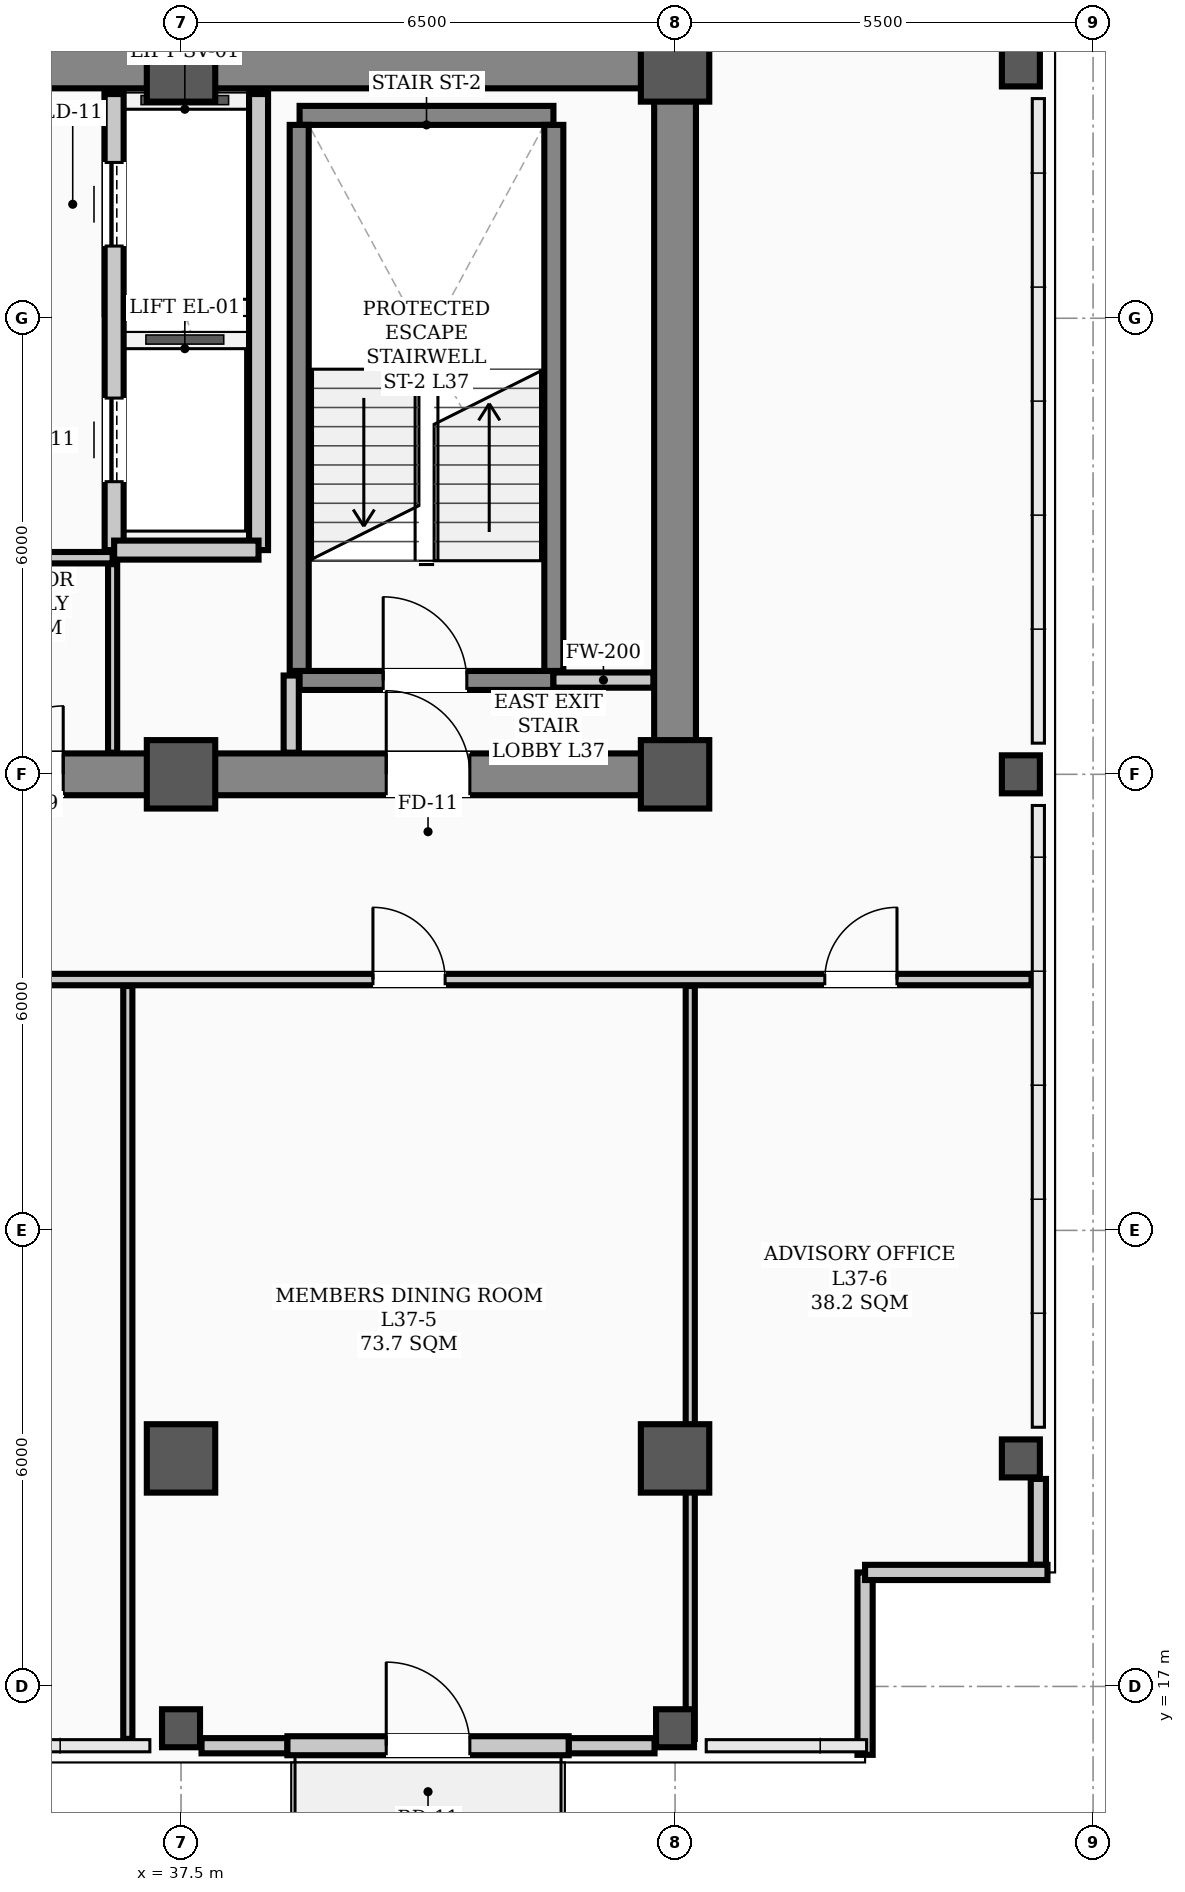
"""IFC4 building model, lengths in metres.
Left out: names, types, materials, properties, quantities, classifications, styles, units other than length and angle.
Written with IfcOpenShell. Run it as: python <this file> out.ifc"""

import sys

from ifc_helpers import new_model, si_unit, direction, frame, frame_2d, origin, origin_2d, place, context, subcontext, project, spatial, rectangle, hollow_rectangle, extrude, element, fill, save


model = new_model("IFC4")
c1 = context("Model", 3, precision=1e-05, world=origin(), true_north=direction((0.0, 1.0)))
c2 = subcontext(c1, "Body", "Model", "MODEL_VIEW")
j1 = project(units=[si_unit("LENGTHUNIT", "METRE"), si_unit("PLANEANGLEUNIT", "RADIAN")], contexts=[c1])
p1 = place(None, origin())
s1 = spatial("IfcSite", under=j1, at=p1, CompositionType="ELEMENT")
p2 = place(p1, origin())
s2 = spatial("IfcBuilding", under=s1, at=p2, CompositionType="ELEMENT")
p3 = place(p2, frame((0.0, 0.0, 150.0)))
s3 = spatial("IfcBuildingStorey", under=s2, at=p3, CompositionType="ELEMENT", Elevation=150.0)
for number, where, z_axis, x_axis in (
    (1, (37.5, 29.0, 0.0), (0.0, 0.0, 1.0), (1.0, 0.0, 0.0)),
    (2, (37.5, 38.3, 0.0), (0.0, 0.0, 1.0), (1.0, 0.0, 0.0)),
    (3, (44.0, 29.0, 0.0), (0.0, 0.0, 1.0), (1.0, 0.0, 0.0)),
    (4, (44.0, 38.3, 0.0), (0.0, 0.0, 1.0), (1.0, 0.0, 0.0)),
    (5, (37.5, 20.0, 0.0), (0.0, 0.0, 1.0), (1.0, 0.0, 0.0)),
    (6, (44.0, 20.0, 0.0), (0.0, 0.0, 1.0), (1.0, 0.0, 0.0)),
):
    element("IfcColumn", number, at=place(p3, frame(where, z_axis=z_axis, x_axis=x_axis)), inside=s3, PredefinedType="COLUMN", context=c2, shape_type="SweptSolid", body=[
        extrude(hollow_rectangle(XDim=0.9, YDim=0.9, WallThickness=0.035, InnerFilletRadius=0.017, OuterFilletRadius=0.052, at=origin_2d()), origin(), (0.0, 0.0, 1.0), 3.9),
    ])
for number, where, z_axis, x_axis in (
    (7, (37.5, 16.45, 0.0), (0.0, 0.0, 1.0), (1.0, 0.0, 0.0)),
    (8, (44.0, 16.45, 0.0), (0.0, 0.0, 1.0), (1.0, 0.0, 0.0)),
    (9, (48.55, 20.0, 0.0), (0.0, 0.0, 1.0), (1.0, 0.0, 0.0)),
    (10, (48.55, 29.0, 0.0), (0.0, 0.0, 1.0), (1.0, 0.0, 0.0)),
    (11, (48.55, 38.3, 0.0), (0.0, 0.0, 1.0), (1.0, 0.0, 0.0)),
):
    element("IfcColumn", number, at=place(p3, frame(where, z_axis=z_axis, x_axis=x_axis)), inside=s3, PredefinedType="COLUMN", context=c2, shape_type="SweptSolid", body=[
        extrude(hollow_rectangle(XDim=0.5, YDim=0.5, WallThickness=0.024, InnerFilletRadius=0.012, OuterFilletRadius=0.036, at=origin_2d()), origin(), (0.0, 0.0, 1.0), 3.9),
    ])
for number, where, z_axis, x_axis in (
    (12, (48.78, 18.6, 0.0), (0.0, 0.0, 1.0), (0.0, 1.0, 0.0)),
    (13, (37.77, 16.22, 0.0), (0.0, 0.0, 1.0), (1.0, 0.0, 0.0)),
    (14, (42.6, 16.22, 0.0), (0.0, 0.0, 1.0), (1.0, 0.0, 0.0)),
):
    element("IfcWall", number, at=place(p3, frame(where, z_axis=z_axis, x_axis=x_axis)), inside=s3, PredefinedType="PARAPET", context=c2, shape_type="SweptSolid", body=[
        extrude(rectangle(XDim=1.13, YDim=0.2, at=frame_2d((0.565, 0.0))), origin(), (0.0, 0.0, 1.0), 1.2),
    ])
for number, where, z_axis, x_axis in (
    (15, (46.5, 16.1, 0.0), (0.0, 0.0, 1.0), (0.0, 1.0, 0.0)),
    (16, (46.5, 18.5, 0.0), (0.0, 0.0, 1.0), (1.0, 0.0, 0.0)),
):
    element("IfcWall", number, at=place(p3, frame(where, z_axis=z_axis, x_axis=x_axis)), inside=s3, PredefinedType="PARAPET", context=c2, shape_type="SweptSolid", body=[
        extrude(rectangle(XDim=2.4, YDim=0.2, at=frame_2d((1.2, 0.0))), origin(), (0.0, 0.0, 1.0), 1.2),
    ])
p4 = place(p3, frame((38.9, 16.22, 0.0), z_axis=(0.0, 0.0, 1.0), x_axis=(1.0, 0.0, 0.0)))
e17 = element("IfcWall", 17, at=p4, inside=s3, PredefinedType="STANDARD", context=c2, shape_type="SweptSolid", body=[
    extrude(rectangle(XDim=3.7, YDim=0.25, at=frame_2d((1.85, 0.0))), origin(), (0.0, 0.0, 1.0), 3.18),
])
p5 = place(p4, frame((1.3, 0.0, 0.0)))
e18 = element("IfcOpeningElement", 18, at=p5, cuts=e17, PredefinedType="OPENING", context=c2, shape_type="SweptSolid", body=[
    extrude(rectangle(XDim=1.1, YDim=2.2, at=frame_2d((0.55, 1.1))), frame((0.0, 0.135, 0.0), z_axis=(0.0, -1.0, 0.0), x_axis=(1.0, 0.0, 0.0)), (0.0, 0.0, 1.0), 0.27),
])
p6 = place(p3, frame((13.5, 29.0, 0.0), z_axis=(0.0, 0.0, 1.0), x_axis=(1.0, 0.0, 0.0)))
e19 = element("IfcWall", 19, at=p6, inside=s3, PredefinedType="SHEAR", context=c2, shape_type="SweptSolid", body=[
    extrude(rectangle(XDim=30.5, YDim=0.55, at=frame_2d((15.25, 0.0))), origin(), (0.0, 0.0, 1.0), 3.72),
])
p7 = place(p6, frame((1.75, 0.0, 0.0)))
e20 = element("IfcOpeningElement", 20, at=p7, cuts=e19, PredefinedType="OPENING", context=c2, shape_type="SweptSolid", body=[
    extrude(rectangle(XDim=1.1, YDim=2.08, at=frame_2d((0.55, 1.04))), frame((0.0, 0.285, 0.0), z_axis=(0.0, -1.0, 0.0), x_axis=(1.0, 0.0, 0.0)), (0.0, 0.0, 1.0), 0.57),
])
p8 = place(p6, frame((26.7, 0.0, 0.0)))
e21 = element("IfcOpeningElement", 21, at=p8, cuts=e19, PredefinedType="OPENING", context=c2, shape_type="SweptSolid", body=[
    extrude(rectangle(XDim=1.1, YDim=2.08, at=frame_2d((0.55, 1.04))), frame((0.0, 0.285, 0.0), z_axis=(0.0, -1.0, 0.0), x_axis=(1.0, 0.0, 0.0)), (0.0, 0.0, 1.0), 0.57),
])
p9 = place(p6, frame((6.8, 0.0, 0.0)))
e22 = element("IfcOpeningElement", 22, at=p9, cuts=e19, PredefinedType="OPENING", context=c2, shape_type="SweptSolid", body=[
    extrude(rectangle(XDim=1.1, YDim=2.08, at=frame_2d((0.55, 1.04))), frame((0.0, 0.285, 0.0), z_axis=(0.0, -1.0, 0.0), x_axis=(1.0, 0.0, 0.0)), (0.0, 0.0, 1.0), 0.57),
])
p10 = place(p6, frame((13.2, 0.0, 0.0)))
e23 = element("IfcOpeningElement", 23, at=p10, cuts=e19, PredefinedType="OPENING", context=c2, shape_type="SweptSolid", body=[
    extrude(rectangle(XDim=1.6, YDim=2.08, at=frame_2d((0.8, 1.04))), frame((0.0, 0.285, 0.0), z_axis=(0.0, -1.0, 0.0), x_axis=(1.0, 0.0, 0.0)), (0.0, 0.0, 1.0), 0.57),
])
p11 = place(p6, frame((19.5, 0.0, 0.0)))
e24 = element("IfcOpeningElement", 24, at=p11, cuts=e19, PredefinedType="OPENING", context=c2, shape_type="SweptSolid", body=[
    extrude(rectangle(XDim=0.9, YDim=2.08, at=frame_2d((0.45, 1.04))), frame((0.0, 0.285, 0.0), z_axis=(0.0, -1.0, 0.0), x_axis=(1.0, 0.0, 0.0)), (0.0, 0.0, 1.0), 0.57),
])
p12 = place(p6, frame((21.55, 0.0, 0.0)))
e25 = element("IfcOpeningElement", 25, at=p12, cuts=e19, PredefinedType="OPENING", context=c2, shape_type="SweptSolid", body=[
    extrude(rectangle(XDim=0.9, YDim=2.08, at=frame_2d((0.45, 1.04))), frame((0.0, 0.285, 0.0), z_axis=(0.0, -1.0, 0.0), x_axis=(1.0, 0.0, 0.0)), (0.0, 0.0, 1.0), 0.57),
])
p13 = place(p3, frame((13.5, 38.3, 0.0), z_axis=(0.0, 0.0, 1.0), x_axis=(1.0, 0.0, 0.0)))
e26 = element("IfcWall", 26, at=p13, inside=s3, PredefinedType="SHEAR", context=c2, shape_type="SweptSolid", body=[
    extrude(rectangle(XDim=30.5, YDim=0.55, at=frame_2d((15.25, 0.0))), origin(), (0.0, 0.0, 1.0), 3.72),
])
p14 = place(p3, frame((44.0, 29.35, 0.0), z_axis=(0.0, 0.0, 1.0), x_axis=(0.0, 1.0, 0.0)))
e27 = element("IfcWall", 27, at=p14, inside=s3, PredefinedType="SHEAR", context=c2, shape_type="SweptSolid", body=[
    extrude(rectangle(XDim=8.6, YDim=0.55, at=frame_2d((4.3, 0.0))), origin(), (0.0, 0.0, 1.0), 3.72),
])
p15 = place(p3, frame((39.06, 30.235, 0.0), z_axis=(0.0, 0.0, 1.0), x_axis=(1.0, 0.0, 0.0)))
e28 = element("IfcWall", 28, at=p15, inside=s3, PredefinedType="STANDARD", context=c2, shape_type="SweptSolid", body=[
    extrude(rectangle(XDim=3.34, YDim=0.25, at=frame_2d((1.67, 0.0))), origin(), (0.0, 0.0, 1.0), 3.72),
])
p16 = place(p15, frame((1.1, 0.0, 0.0)))
e29 = element("IfcOpeningElement", 29, at=p16, cuts=e28, PredefinedType="OPENING", context=c2, shape_type="SweptSolid", body=[
    extrude(rectangle(XDim=1.1, YDim=2.08, at=frame_2d((0.55, 1.04))), frame((0.0, 0.135, 0.0), z_axis=(0.0, -1.0, 0.0), x_axis=(1.0, 0.0, 0.0)), (0.0, 0.0, 1.0), 0.27),
])
p17 = place(p3, frame((39.06, 37.669, 0.0), z_axis=(0.0, 0.0, 1.0), x_axis=(1.0, 0.0, 0.0)))
e30 = element("IfcWall", 30, at=p17, inside=s3, PredefinedType="STANDARD", context=c2, shape_type="SweptSolid", body=[
    extrude(rectangle(XDim=3.34, YDim=0.25, at=frame_2d((1.67, 0.0))), origin(), (0.0, 0.0, 1.0), 3.72),
])
for number, where, z_axis, x_axis in (
    (31, (39.055, 30.36, 0.0), (0.0, 0.0, 1.0), (0.0, 1.0, 0.0)),
    (32, (42.405, 30.36, 0.0), (0.0, 0.0, 1.0), (0.0, 1.0, 0.0)),
):
    element("IfcWall", number, at=place(p3, frame(where, z_axis=z_axis, x_axis=x_axis)), inside=s3, PredefinedType="STANDARD", context=c2, shape_type="SweptSolid", body=[
        extrude(rectangle(XDim=7.184, YDim=0.25, at=frame_2d((3.592, 0.0))), origin(), (0.0, 0.0, 1.0), 3.72),
    ])
p18 = place(p3, frame((36.62, 31.95, 0.0), z_axis=(0.0, 0.0, 1.0), x_axis=(0.0, 1.0, 0.0)))
e33 = element("IfcWall", 33, at=p18, inside=s3, PredefinedType="STANDARD", context=c2, shape_type="SweptSolid", body=[
    extrude(rectangle(XDim=6.0, YDim=0.25, at=frame_2d((3.0, 0.0))), origin(), (0.0, 0.0, 1.0), 3.35),
])
p19 = place(p18, frame((0.9, 0.0, 0.0)))
e34 = element("IfcOpeningElement", 34, at=p19, cuts=e33, PredefinedType="OPENING", context=c2, shape_type="SweptSolid", body=[
    extrude(rectangle(XDim=1.1, YDim=2.08, at=frame_2d((0.55, 1.04))), frame((0.0, 0.135, 0.0), z_axis=(0.0, -1.0, 0.0), x_axis=(1.0, 0.0, 0.0)), (0.0, 0.0, 1.0), 0.27),
])
p20 = place(p18, frame((4.0, 0.0, 0.0)))
e35 = element("IfcOpeningElement", 35, at=p20, cuts=e33, PredefinedType="OPENING", context=c2, shape_type="SweptSolid", body=[
    extrude(rectangle(XDim=1.1, YDim=2.08, at=frame_2d((0.55, 1.04))), frame((0.0, 0.135, 0.0), z_axis=(0.0, -1.0, 0.0), x_axis=(1.0, 0.0, 0.0)), (0.0, 0.0, 1.0), 0.27),
])
p21 = place(p3, frame((38.52, 31.95, 0.0), z_axis=(0.0, 0.0, 1.0), x_axis=(0.0, 1.0, 0.0)))
e36 = element("IfcWall", 36, at=p21, inside=s3, PredefinedType="STANDARD", context=c2, shape_type="SweptSolid", body=[
    extrude(rectangle(XDim=6.0, YDim=0.25, at=frame_2d((3.0, 0.0))), origin(), (0.0, 0.0, 1.0), 3.35),
])
p22 = place(p3, frame((36.62, 31.95, 0.0), z_axis=(0.0, 0.0, 1.0), x_axis=(1.0, 0.0, 0.0)))
e37 = element("IfcWall", 37, at=p22, inside=s3, PredefinedType="STANDARD", context=c2, shape_type="SweptSolid", body=[
    extrude(rectangle(XDim=1.9, YDim=0.25, at=frame_2d((0.95, 0.0))), origin(), (0.0, 0.0, 1.0), 3.48),
])
p23 = place(p3, frame((42.4, 30.24, 0.0), z_axis=(0.0, 0.0, 1.0), x_axis=(1.0, 0.0, 0.0)))
e38 = element("IfcWall", 38, at=p23, inside=s3, PredefinedType="STANDARD", context=c2, shape_type="SweptSolid", body=[
    extrude(rectangle(XDim=1.315, YDim=0.2, at=frame_2d((0.658, 0.0))), origin(), (0.0, 0.0, 1.0), 3.2),
])
p24 = place(p3, frame((32.5, 31.85, 0.0), z_axis=(0.0, 0.0, 1.0), x_axis=(1.0, 0.0, 0.0)))
e39 = element("IfcWall", 39, at=p24, inside=s3, PredefinedType="PARTITIONING", context=c2, shape_type="SweptSolid", body=[
    extrude(rectangle(XDim=4.1, YDim=0.15, at=frame_2d((2.05, 0.0))), origin(), (0.0, 0.0, 1.0), 3.72),
])
p25 = place(p3, frame((2.31, 26.3, 0.0), z_axis=(0.0, 0.0, 1.0), x_axis=(1.0, 0.0, 0.0)))
e40 = element("IfcWall", 40, at=p25, inside=s3, PredefinedType="PARTITIONING", context=c2, shape_type="SweptSolid", body=[
    extrude(rectangle(XDim=46.38, YDim=0.15, at=frame_2d((23.19, 0.0))), origin(), (0.0, 0.0, 1.0), 3.2),
])
p26 = place(p25, frame((9.39, 0.0, 0.0)))
e41 = element("IfcOpeningElement", 41, at=p26, cuts=e40, PredefinedType="OPENING", context=c2, shape_type="SweptSolid", body=[
    extrude(rectangle(XDim=0.95, YDim=2.08, at=frame_2d((0.475, 1.04))), frame((0.0, 0.085, 0.0), z_axis=(0.0, -1.0, 0.0), x_axis=(1.0, 0.0, 0.0)), (0.0, 0.0, 1.0), 0.17),
])
p27 = place(p25, frame((14.215, 0.0, 0.0)))
e42 = element("IfcOpeningElement", 42, at=p27, cuts=e40, PredefinedType="OPENING", context=c2, shape_type="SweptSolid", body=[
    extrude(rectangle(XDim=0.95, YDim=2.08, at=frame_2d((0.475, 1.04))), frame((0.0, 0.085, 0.0), z_axis=(0.0, -1.0, 0.0), x_axis=(1.0, 0.0, 0.0)), (0.0, 0.0, 1.0), 0.17),
])
p28 = place(p25, frame((19.115, 0.0, 0.0)))
e43 = element("IfcOpeningElement", 43, at=p28, cuts=e40, PredefinedType="OPENING", context=c2, shape_type="SweptSolid", body=[
    extrude(rectangle(XDim=0.95, YDim=2.08, at=frame_2d((0.475, 1.04))), frame((0.0, 0.085, 0.0), z_axis=(0.0, -1.0, 0.0), x_axis=(1.0, 0.0, 0.0)), (0.0, 0.0, 1.0), 0.17),
])
p29 = place(p25, frame((23.065, 0.0, 0.0)))
e44 = element("IfcOpeningElement", 44, at=p29, cuts=e40, PredefinedType="OPENING", context=c2, shape_type="SweptSolid", body=[
    extrude(rectangle(XDim=0.95, YDim=2.08, at=frame_2d((0.475, 1.04))), frame((0.0, 0.085, 0.0), z_axis=(0.0, -1.0, 0.0), x_axis=(1.0, 0.0, 0.0)), (0.0, 0.0, 1.0), 0.17),
])
p30 = place(p25, frame((37.715, 0.0, 0.0)))
e45 = element("IfcOpeningElement", 45, at=p30, cuts=e40, PredefinedType="OPENING", context=c2, shape_type="SweptSolid", body=[
    extrude(rectangle(XDim=0.95, YDim=2.08, at=frame_2d((0.475, 1.04))), frame((0.0, 0.085, 0.0), z_axis=(0.0, -1.0, 0.0), x_axis=(1.0, 0.0, 0.0)), (0.0, 0.0, 1.0), 0.17),
])
p31 = place(p25, frame((43.66, 0.0, 0.0)))
e46 = element("IfcOpeningElement", 46, at=p31, cuts=e40, PredefinedType="OPENING", context=c2, shape_type="SweptSolid", body=[
    extrude(rectangle(XDim=0.95, YDim=2.08, at=frame_2d((0.475, 1.04))), frame((0.0, 0.085, 0.0), z_axis=(0.0, -1.0, 0.0), x_axis=(1.0, 0.0, 0.0)), (0.0, 0.0, 1.0), 0.17),
])
p32 = place(p3, frame((38.95, 29.285, 0.0), z_axis=(0.0, 0.0, 1.0), x_axis=(0.0, 1.0, 0.0)))
e47 = element("IfcWall", 47, at=p32, inside=s3, PredefinedType="STANDARD", context=c2, shape_type="SweptSolid", body=[
    extrude(rectangle(XDim=1.015, YDim=0.2, at=frame_2d((0.508, 0.0))), origin(), (0.0, 0.0, 1.0), 3.35),
])
p33 = place(p3, frame((36.6, 29.285, 0.0), z_axis=(0.0, 0.0, 1.0), x_axis=(0.0, 1.0, 0.0)))
e48 = element("IfcWall", 48, at=p33, inside=s3, PredefinedType="PARTITIONING", context=c2, shape_type="SweptSolid", body=[
    extrude(rectangle(XDim=2.48, YDim=0.12, at=frame_2d((1.24, 0.0))), origin(), (0.0, 0.0, 1.0), 3.35),
])
for number, where, z_axis, x_axis in (
    (49, (36.8, 16.31, 0.0), (0.0, 0.0, 1.0), (0.0, 1.0, 0.0)),
    (50, (44.2, 16.31, 0.0), (0.0, 0.0, 1.0), (0.0, 1.0, 0.0)),
):
    element("IfcWall", number, at=place(p3, frame(where, z_axis=z_axis, x_axis=x_axis)), inside=s3, PredefinedType="PARTITIONING", context=c2, shape_type="SweptSolid", body=[
        extrude(rectangle(XDim=9.905, YDim=0.12, at=frame_2d((4.953, 0.0))), origin(), (0.0, 0.0, 1.0), 3.1),
    ])
p34 = place(p5, origin())
e51 = element("IfcDoor", 51, at=p34, inside=s3, OperationType="SINGLE_SWING_LEFT", PredefinedType="DOOR", context=c2, shape_type="SweptSolid", body=[
    extrude(rectangle(XDim=1.1, YDim=2.2, at=frame_2d((0.55, 1.1))), frame((0.0, 0.025, 0.0), z_axis=(0.0, -1.0, 0.0), x_axis=(1.0, 0.0, 0.0)), (0.0, 0.0, 1.0), 0.05),
])
fill(e18, e51)
p35 = place(p16, origin())
e52 = element("IfcDoor", 52, at=p35, inside=s3, OperationType="SINGLE_SWING_LEFT", PredefinedType="DOOR", context=c2, shape_type="SweptSolid", body=[
    extrude(rectangle(XDim=1.1, YDim=2.08, at=frame_2d((0.55, 1.04))), frame((0.0, 0.025, 0.0), z_axis=(0.0, -1.0, 0.0), x_axis=(1.0, 0.0, 0.0)), (0.0, 0.0, 1.0), 0.05),
])
fill(e29, e52)
p36 = place(p8, origin())
e53 = element("IfcDoor", 53, at=p36, inside=s3, OperationType="SINGLE_SWING_LEFT", PredefinedType="DOOR", context=c2, shape_type="SweptSolid", body=[
    extrude(rectangle(XDim=1.1, YDim=2.08, at=frame_2d((0.55, 1.04))), frame((0.0, 0.025, 0.0), z_axis=(0.0, -1.0, 0.0), x_axis=(1.0, 0.0, 0.0)), (0.0, 0.0, 1.0), 0.05),
])
fill(e21, e53)
p37 = place(p12, origin())
e54 = element("IfcDoor", 54, at=p37, inside=s3, OperationType="SINGLE_SWING_RIGHT", PredefinedType="DOOR", context=c2, shape_type="SweptSolid", body=[
    extrude(rectangle(XDim=0.9, YDim=2.08, at=frame_2d((0.45, 1.04))), frame((0.0, 0.025, 0.0), z_axis=(0.0, -1.0, 0.0), x_axis=(1.0, 0.0, 0.0)), (0.0, 0.0, 1.0), 0.05),
])
fill(e25, e54)
p38 = place(p30, origin())
e55 = element("IfcDoor", 55, at=p38, inside=s3, OperationType="SINGLE_SWING_LEFT", PredefinedType="DOOR", context=c2, shape_type="SweptSolid", body=[
    extrude(rectangle(XDim=0.95, YDim=2.08, at=frame_2d((0.475, 1.04))), frame((0.0, 0.025, 0.0), z_axis=(0.0, -1.0, 0.0), x_axis=(1.0, 0.0, 0.0)), (0.0, 0.0, 1.0), 0.05),
])
fill(e45, e55)
p39 = place(p31, origin())
e56 = element("IfcDoor", 56, at=p39, inside=s3, OperationType="SINGLE_SWING_RIGHT", PredefinedType="DOOR", context=c2, shape_type="SweptSolid", body=[
    extrude(rectangle(XDim=0.95, YDim=2.08, at=frame_2d((0.475, 1.04))), frame((0.0, 0.025, 0.0), z_axis=(0.0, -1.0, 0.0), x_axis=(1.0, 0.0, 0.0)), (0.0, 0.0, 1.0), 0.05),
])
fill(e46, e56)
p40 = place(p19, origin())
e57 = element("IfcDoor", 57, at=p40, inside=s3, OperationType="SLIDING_TO_LEFT", PredefinedType="DOOR", context=c2, shape_type="SweptSolid", body=[
    extrude(rectangle(XDim=1.1, YDim=2.08, at=frame_2d((0.55, 1.04))), frame((0.0, 0.025, 0.0), z_axis=(0.0, -1.0, 0.0), x_axis=(1.0, 0.0, 0.0)), (0.0, 0.0, 1.0), 0.05),
])
fill(e34, e57)
p41 = place(p20, origin())
e58 = element("IfcDoor", 58, at=p41, inside=s3, OperationType="SLIDING_TO_LEFT", PredefinedType="DOOR", context=c2, shape_type="SweptSolid", body=[
    extrude(rectangle(XDim=1.1, YDim=2.08, at=frame_2d((0.55, 1.04))), frame((0.0, 0.025, 0.0), z_axis=(0.0, -1.0, 0.0), x_axis=(1.0, 0.0, 0.0)), (0.0, 0.0, 1.0), 0.05),
])
fill(e35, e58)
save(model, sys.argv[1])
